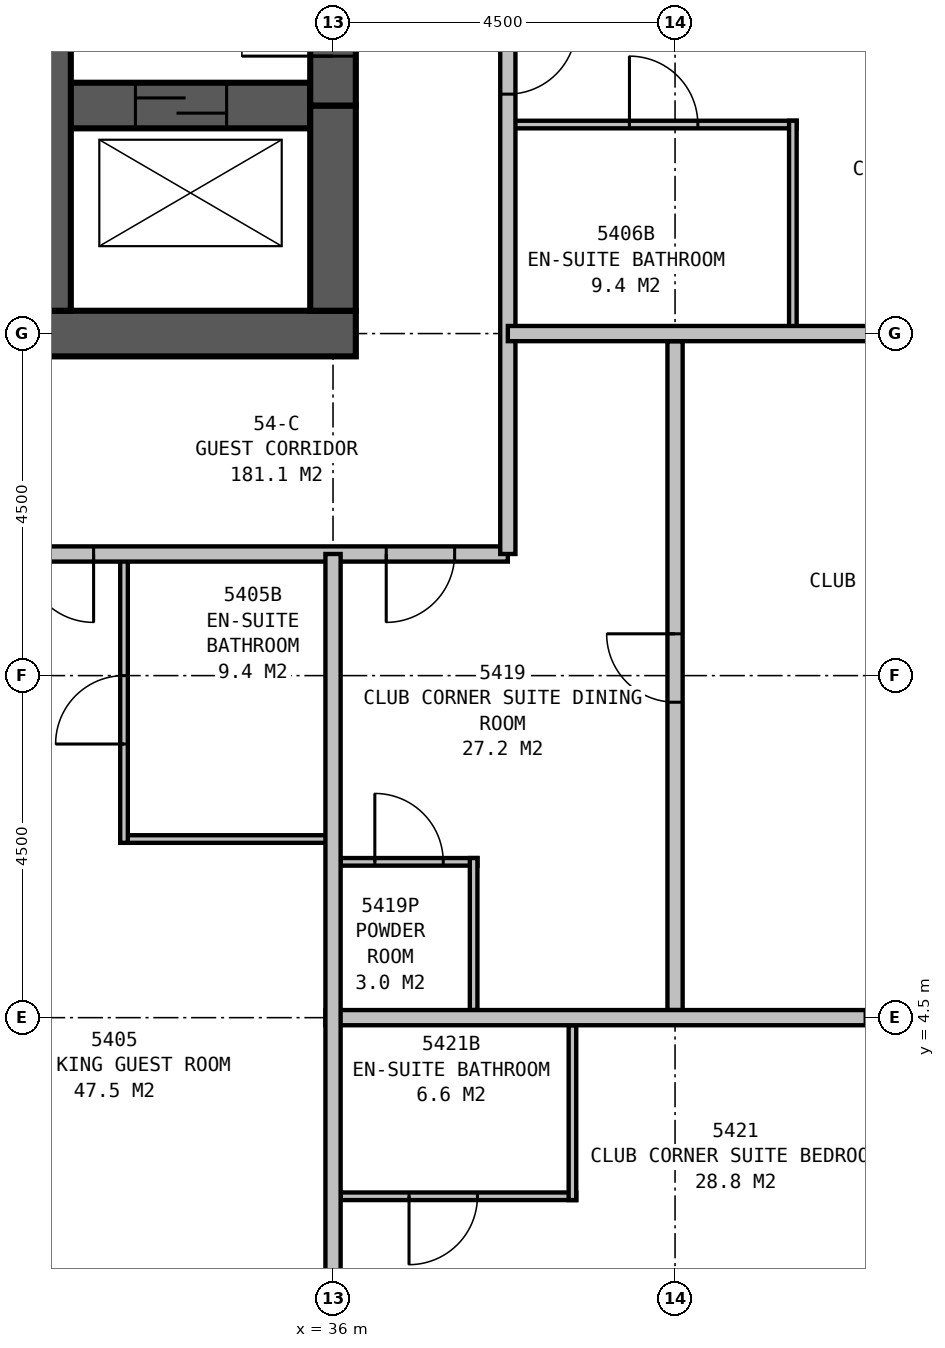
"""IFC4 building model, lengths in metres.
Left out: names, types, materials, properties, quantities, classifications, styles, units other than length and angle.
Written with IfcOpenShell. Run it as: python <this file> out.ifc"""

import sys

from ifc_helpers import new_model, si_unit, direction, frame, frame_2d, origin, place, context, subcontext, project, spatial, rectangle, extrude, element, fill, save


model = new_model("IFC4")
c1 = context("Model", 3, precision=1e-05, world=origin(), true_north=direction((0.0, 1.0)))
c2 = subcontext(c1, "Body", "Model", "MODEL_VIEW")
j1 = project(units=[si_unit("LENGTHUNIT", "METRE"), si_unit("PLANEANGLEUNIT", "RADIAN")], contexts=[c1])
p1 = place(None, origin())
s1 = spatial("IfcSite", under=j1, at=p1, CompositionType="ELEMENT")
p2 = place(p1, origin())
s2 = spatial("IfcBuilding", under=s1, at=p2, CompositionType="ELEMENT")
p3 = place(p2, frame((0.0, 0.0, 207.9)))
s3 = spatial("IfcBuildingStorey", under=s2, at=p3, CompositionType="ELEMENT", Elevation=207.9)
p4 = place(p3, frame((13.2, 13.5, 0.0), z_axis=(0.0, 0.0, 1.0), x_axis=(1.0, 0.0, 0.0)))
e1 = element("IfcWall", 1, at=p4, inside=s3, PredefinedType="SHEAR", context=c2, shape_type="SweptSolid", body=[
    extrude(rectangle(XDim=23.1, YDim=0.6, at=frame_2d((11.55, 0.0))), origin(), (0.0, 0.0, 1.0), 3.5),
])
p5 = place(p3, frame((32.25, 13.8, 0.0), z_axis=(0.0, 0.0, 1.0), x_axis=(0.0, 1.0, 0.0)))
e2 = element("IfcWall", 2, at=p5, inside=s3, PredefinedType="SHEAR", context=c2, shape_type="SweptSolid", body=[
    extrude(rectangle(XDim=12.9, YDim=0.6, at=frame_2d((6.45, 0.0))), origin(), (0.0, 0.0, 1.0), 3.5),
])
p6 = place(p5, frame((5.05, 0.0, 0.0), z_axis=(0.0, 0.0, 1.0), x_axis=(-1.0, 0.0, 0.0)))
e3 = element("IfcOpeningElement", 3, at=p6, cuts=e2, PredefinedType="OPENING", context=c2, shape_type="SweptSolid", body=[
    extrude(rectangle(XDim=1.2, YDim=2.1, at=frame_2d((0.6, 1.05))), frame((0.0, 0.31, 0.0), z_axis=(0.0, -1.0, 0.0), x_axis=(1.0, 0.0, 0.0)), (0.0, 0.0, 1.0), 0.62),
])
p7 = place(p3, frame((13.8, 16.5, 0.0), z_axis=(0.0, 0.0, 1.0), x_axis=(1.0, 0.0, 0.0)))
e4 = element("IfcWall", 4, at=p7, inside=s3, PredefinedType="SHEAR", context=c2, shape_type="SweptSolid", body=[
    extrude(rectangle(XDim=21.9, YDim=0.6, at=frame_2d((10.95, 0.0))), origin(), (0.0, 0.0, 1.0), 3.5),
])
p8 = place(p7, frame((5.75, 0.0, 0.0), z_axis=(0.0, 0.0, 1.0), x_axis=(-1.0, 0.0, 0.0)))
e5 = element("IfcOpeningElement", 5, at=p8, cuts=e4, PredefinedType="OPENING", context=c2, shape_type="SweptSolid", body=[
    extrude(rectangle(XDim=1.0, YDim=2.1, at=frame_2d((0.5, 1.05))), frame((0.0, 0.31, 0.0), z_axis=(0.0, -1.0, 0.0), x_axis=(1.0, 0.0, 0.0)), (0.0, 0.0, 1.0), 0.62),
])
p9 = place(p7, frame((10.2, 0.0, 0.0), z_axis=(0.0, 0.0, 1.0), x_axis=(-1.0, 0.0, 0.0)))
e6 = element("IfcOpeningElement", 6, at=p9, cuts=e4, PredefinedType="OPENING", context=c2, shape_type="SweptSolid", body=[
    extrude(rectangle(XDim=1.0, YDim=2.1, at=frame_2d((0.5, 1.05))), frame((0.0, 0.31, 0.0), z_axis=(0.0, -1.0, 0.0), x_axis=(1.0, 0.0, 0.0)), (0.0, 0.0, 1.0), 0.62),
])
p10 = place(p7, frame((12.7, 0.0, 0.0), z_axis=(0.0, 0.0, 1.0), x_axis=(-1.0, 0.0, 0.0)))
e7 = element("IfcOpeningElement", 7, at=p10, cuts=e4, PredefinedType="OPENING", context=c2, shape_type="SweptSolid", body=[
    extrude(rectangle(XDim=1.0, YDim=2.1, at=frame_2d((0.5, 1.05))), frame((0.0, 0.31, 0.0), z_axis=(0.0, -1.0, 0.0), x_axis=(1.0, 0.0, 0.0)), (0.0, 0.0, 1.0), 0.62),
])
p11 = place(p7, frame((17.15, 0.0, 0.0), z_axis=(0.0, 0.0, 1.0), x_axis=(-1.0, 0.0, 0.0)))
e8 = element("IfcOpeningElement", 8, at=p11, cuts=e4, PredefinedType="OPENING", context=c2, shape_type="SweptSolid", body=[
    extrude(rectangle(XDim=1.0, YDim=2.1, at=frame_2d((0.5, 1.05))), frame((0.0, 0.31, 0.0), z_axis=(0.0, -1.0, 0.0), x_axis=(1.0, 0.0, 0.0)), (0.0, 0.0, 1.0), 0.62),
])
p12 = place(p7, frame((0.6, 0.0, 0.0)))
e9 = element("IfcOpeningElement", 9, at=p12, cuts=e4, PredefinedType="OPENING", context=c2, shape_type="SweptSolid", body=[
    extrude(rectangle(XDim=1.2, YDim=2.1, at=frame_2d((0.6, 1.05))), frame((0.0, 0.31, 0.0), z_axis=(0.0, -1.0, 0.0), x_axis=(1.0, 0.0, 0.0)), (0.0, 0.0, 1.0), 0.62),
])
p13 = place(p7, frame((19.6, 0.0, 0.0)))
e10 = element("IfcOpeningElement", 10, at=p13, cuts=e4, PredefinedType="OPENING", context=c2, shape_type="SweptSolid", body=[
    extrude(rectangle(XDim=1.2, YDim=2.1, at=frame_2d((0.6, 1.05))), frame((0.0, 0.31, 0.0), z_axis=(0.0, -1.0, 0.0), x_axis=(1.0, 0.0, 0.0)), (0.0, 0.0, 1.0), 0.62),
])
p14 = place(p3, frame((36.0, 13.8, 0.0), z_axis=(0.0, 0.0, 1.0), x_axis=(0.0, 1.0, 0.0)))
e11 = element("IfcWall", 11, at=p14, inside=s3, PredefinedType="SHEAR", context=c2, shape_type="SweptSolid", body=[
    extrude(rectangle(XDim=2.7, YDim=0.6, at=frame_2d((1.35, 0.0))), origin(), (0.0, 0.0, 1.0), 3.5),
])
p15 = place(p3, frame((36.0, 16.5, 0.0), z_axis=(0.0, 0.0, 1.0), x_axis=(0.0, 1.0, 0.0)))
e12 = element("IfcWall", 12, at=p15, inside=s3, PredefinedType="SHEAR", context=c2, shape_type="SweptSolid", body=[
    extrude(rectangle(XDim=3.5, YDim=0.6, at=frame_2d((1.75, 0.0))), origin(), (0.0, 0.0, 1.0), 3.5),
])
p16 = place(p15, frame((0.65, 0.0, 0.0)))
e13 = element("IfcOpeningElement", 13, at=p16, cuts=e12, PredefinedType="OPENING", context=c2, shape_type="SweptSolid", body=[
    extrude(rectangle(XDim=1.2, YDim=2.1, at=frame_2d((0.6, 1.05))), frame((0.0, 0.31, 0.0), z_axis=(0.0, -1.0, 0.0), x_axis=(1.0, 0.0, 0.0)), (0.0, 0.0, 1.0), 0.62),
])
p17 = place(p3, frame((11.2, 10.6, 0.0), z_axis=(0.0, 0.0, 1.0), x_axis=(1.0, 0.0, 0.0)))
e14 = element("IfcWall", 14, at=p17, inside=s3, PredefinedType="PARTITIONING", context=c2, shape_type="SweptSolid", body=[
    extrude(rectangle(XDim=27.1, YDim=0.2, at=frame_2d((13.55, 0.0))), origin(), (0.0, 0.0, 1.0), 3.25),
])
p18 = place(p17, frame((3.5, 0.0, 0.0), z_axis=(0.0, 0.0, 1.0), x_axis=(-1.0, 0.0, 0.0)))
e15 = element("IfcOpeningElement", 15, at=p18, cuts=e14, PredefinedType="OPENING", context=c2, shape_type="SweptSolid", body=[
    extrude(rectangle(XDim=0.9, YDim=2.1, at=frame_2d((0.45, 1.05))), frame((0.0, 0.11, 0.0), z_axis=(0.0, -1.0, 0.0), x_axis=(1.0, 0.0, 0.0)), (0.0, 0.0, 1.0), 0.22),
])
p19 = place(p17, frame((15.9, 0.0, 0.0), z_axis=(0.0, 0.0, 1.0), x_axis=(-1.0, 0.0, 0.0)))
e16 = element("IfcOpeningElement", 16, at=p19, cuts=e14, PredefinedType="OPENING", context=c2, shape_type="SweptSolid", body=[
    extrude(rectangle(XDim=1.0, YDim=2.1, at=frame_2d((0.5, 1.05))), frame((0.0, 0.11, 0.0), z_axis=(0.0, -1.0, 0.0), x_axis=(1.0, 0.0, 0.0)), (0.0, 0.0, 1.0), 0.22),
])
p20 = place(p17, frame((21.65, 0.0, 0.0), z_axis=(0.0, 0.0, 1.0), x_axis=(-1.0, 0.0, 0.0)))
e17 = element("IfcOpeningElement", 17, at=p20, cuts=e14, PredefinedType="OPENING", context=c2, shape_type="SweptSolid", body=[
    extrude(rectangle(XDim=0.9, YDim=2.1, at=frame_2d((0.45, 1.05))), frame((0.0, 0.11, 0.0), z_axis=(0.0, -1.0, 0.0), x_axis=(1.0, 0.0, 0.0)), (0.0, 0.0, 1.0), 0.22),
])
p21 = place(p17, frame((1.6, 0.0, 0.0), z_axis=(0.0, 0.0, 1.0), x_axis=(-1.0, 0.0, 0.0)))
e18 = element("IfcOpeningElement", 18, at=p21, cuts=e14, PredefinedType="OPENING", context=c2, shape_type="SweptSolid", body=[
    extrude(rectangle(XDim=0.9, YDim=2.1, at=frame_2d((0.45, 1.05))), frame((0.0, 0.11, 0.0), z_axis=(0.0, -1.0, 0.0), x_axis=(1.0, 0.0, 0.0)), (0.0, 0.0, 1.0), 0.22),
])
p22 = place(p17, frame((26.4, 0.0, 0.0), z_axis=(0.0, 0.0, 1.0), x_axis=(-1.0, 0.0, 0.0)))
e19 = element("IfcOpeningElement", 19, at=p22, cuts=e14, PredefinedType="OPENING", context=c2, shape_type="SweptSolid", body=[
    extrude(rectangle(XDim=0.9, YDim=2.1, at=frame_2d((0.45, 1.05))), frame((0.0, 0.11, 0.0), z_axis=(0.0, -1.0, 0.0), x_axis=(1.0, 0.0, 0.0)), (0.0, 0.0, 1.0), 0.22),
])
p23 = place(p3, frame((38.3, 10.6, 0.0), z_axis=(0.0, 0.0, 1.0), x_axis=(0.0, 1.0, 0.0)))
e20 = element("IfcWall", 20, at=p23, inside=s3, PredefinedType="PARTITIONING", context=c2, shape_type="SweptSolid", body=[
    extrude(rectangle(XDim=18.7, YDim=0.2, at=frame_2d((9.35, 0.0))), origin(), (0.0, 0.0, 1.0), 3.25),
])
p24 = place(p23, frame((6.95, 0.0, 0.0), z_axis=(0.0, 0.0, 1.0), x_axis=(-1.0, 0.0, 0.0)))
e21 = element("IfcOpeningElement", 21, at=p24, cuts=e20, PredefinedType="OPENING", context=c2, shape_type="SweptSolid", body=[
    extrude(rectangle(XDim=0.9, YDim=2.1, at=frame_2d((0.45, 1.05))), frame((0.0, 0.11, 0.0), z_axis=(0.0, -1.0, 0.0), x_axis=(1.0, 0.0, 0.0)), (0.0, 0.0, 1.0), 0.22),
])
p25 = place(p23, frame((10.9, 0.0, 0.0), z_axis=(0.0, 0.0, 1.0), x_axis=(-1.0, 0.0, 0.0)))
e22 = element("IfcOpeningElement", 22, at=p25, cuts=e20, PredefinedType="OPENING", context=c2, shape_type="SweptSolid", body=[
    extrude(rectangle(XDim=0.9, YDim=2.1, at=frame_2d((0.45, 1.05))), frame((0.0, 0.11, 0.0), z_axis=(0.0, -1.0, 0.0), x_axis=(1.0, 0.0, 0.0)), (0.0, 0.0, 1.0), 0.22),
])
p26 = place(p3, frame((33.2, 6.85, 0.0), z_axis=(0.0, 0.0, 1.0), x_axis=(1.0, 0.0, 0.0)))
e23 = element("IfcWall", 23, at=p26, inside=s3, PredefinedType="PLUMBINGWALL", context=c2, shape_type="SweptSolid", body=[
    extrude(rectangle(XDim=2.8, YDim=0.1, at=frame_2d((1.4, 0.0))), origin(), (0.0, 0.0, 1.0), 3.25),
])
p27 = place(p3, frame((33.25, 10.6, 0.0), z_axis=(0.0, 0.0, 1.0), x_axis=(0.0, -1.0, 0.0)))
e24 = element("IfcWall", 24, at=p27, inside=s3, PredefinedType="PLUMBINGWALL", context=c2, shape_type="SweptSolid", body=[
    extrude(rectangle(XDim=3.8, YDim=0.1, at=frame_2d((1.9, 0.0))), origin(), (0.0, 0.0, 1.0), 3.25),
])
p28 = place(p27, frame((2.5, 0.0, 0.0), z_axis=(0.0, 0.0, 1.0), x_axis=(-1.0, 0.0, 0.0)))
e25 = element("IfcOpeningElement", 25, at=p28, cuts=e24, PredefinedType="OPENING", context=c2, shape_type="SweptSolid", body=[
    extrude(rectangle(XDim=0.9, YDim=2.1, at=frame_2d((0.45, 1.05))), frame((0.0, 0.06, 0.0), z_axis=(0.0, -1.0, 0.0), x_axis=(1.0, 0.0, 0.0)), (0.0, 0.0, 1.0), 0.12),
])
p29 = place(p3, frame((42.05, 13.5, 0.0), z_axis=(0.0, 0.0, 1.0), x_axis=(0.0, 1.0, 0.0)))
e26 = element("IfcWall", 26, at=p29, inside=s3, PredefinedType="PLUMBINGWALL", context=c2, shape_type="SweptSolid", body=[
    extrude(rectangle(XDim=2.8, YDim=0.1, at=frame_2d((1.4, 0.0))), origin(), (0.0, 0.0, 1.0), 3.25),
])
p30 = place(p3, frame((38.3, 16.25, 0.0), z_axis=(0.0, 0.0, 1.0), x_axis=(1.0, 0.0, 0.0)))
e27 = element("IfcWall", 27, at=p30, inside=s3, PredefinedType="PLUMBINGWALL", context=c2, shape_type="SweptSolid", body=[
    extrude(rectangle(XDim=3.8, YDim=0.1, at=frame_2d((1.9, 0.0))), origin(), (0.0, 0.0, 1.0), 3.25),
])
p31 = place(p30, frame((1.6, 0.0, 0.0)))
e28 = element("IfcOpeningElement", 28, at=p31, cuts=e27, PredefinedType="OPENING", context=c2, shape_type="SweptSolid", body=[
    extrude(rectangle(XDim=0.9, YDim=2.1, at=frame_2d((0.45, 1.05))), frame((0.0, 0.06, 0.0), z_axis=(0.0, -1.0, 0.0), x_axis=(1.0, 0.0, 0.0)), (0.0, 0.0, 1.0), 0.12),
])
p32 = place(p3, frame((38.3, 13.5, 0.0), z_axis=(0.0, 0.0, 1.0), x_axis=(1.0, 0.0, 0.0)))
e29 = element("IfcWall", 29, at=p32, inside=s3, PredefinedType="PARTITIONING", context=c2, shape_type="SweptSolid", body=[
    extrude(rectangle(XDim=9.921, YDim=0.2, at=frame_2d((4.96, 0.0))), origin(), (0.0, 0.0, 1.0), 1.9),
])
p33 = place(p3, frame((36.0, 10.6, 0.0), z_axis=(0.0, 0.0, 1.0), x_axis=(0.0, -1.0, 0.0)))
e30 = element("IfcWall", 30, at=p33, inside=s3, PredefinedType="PARTITIONING", context=c2, shape_type="SweptSolid", body=[
    extrude(rectangle(XDim=10.6, YDim=0.2, at=frame_2d((5.3, 0.0))), origin(), (0.0, 0.0, 1.0), 2.2),
])
p34 = place(p3, frame((35.9, 4.5, 0.0), z_axis=(0.0, 0.0, 1.0), x_axis=(1.0, 0.0, 0.0)))
e31 = element("IfcWall", 31, at=p34, inside=s3, PredefinedType="PARTITIONING", context=c2, shape_type="SweptSolid", body=[
    extrude(rectangle(XDim=9.1, YDim=0.2, at=frame_2d((4.55, 0.0))), origin(), (0.0, 0.0, 1.0), 3.25),
])
p35 = place(p34, frame((7.1, 0.0, 0.0)))
e32 = element("IfcOpeningElement", 32, at=p35, cuts=e31, PredefinedType="OPENING", context=c2, shape_type="SweptSolid", body=[
    extrude(rectangle(XDim=0.9, YDim=2.1, at=frame_2d((0.45, 1.05))), frame((0.0, 0.11, 0.0), z_axis=(0.0, -1.0, 0.0), x_axis=(1.0, 0.0, 0.0)), (0.0, 0.0, 1.0), 0.22),
])
p36 = place(p3, frame((40.5, 4.6, 0.0), z_axis=(0.0, 0.0, 1.0), x_axis=(0.0, 1.0, 0.0)))
e33 = element("IfcWall", 33, at=p36, inside=s3, PredefinedType="PARTITIONING", context=c2, shape_type="SweptSolid", body=[
    extrude(rectangle(XDim=8.8, YDim=0.2, at=frame_2d((4.4, 0.0))), origin(), (0.0, 0.0, 1.0), 2.2),
])
p37 = place(p36, frame((4.05, 0.0, 0.0)))
e34 = element("IfcOpeningElement", 34, at=p37, cuts=e33, PredefinedType="OPENING", context=c2, shape_type="SweptSolid", body=[
    extrude(rectangle(XDim=0.9, YDim=2.1, at=frame_2d((0.45, 1.05))), frame((0.0, 0.11, 0.0), z_axis=(0.0, -1.0, 0.0), x_axis=(1.0, 0.0, 0.0)), (0.0, 0.0, 1.0), 0.22),
])
p38 = place(p3, frame((37.85, 4.6, 0.0), z_axis=(0.0, 0.0, 1.0), x_axis=(0.0, 1.0, 0.0)))
e35 = element("IfcWall", 35, at=p38, inside=s3, PredefinedType="PLUMBINGWALL", context=c2, shape_type="SweptSolid", body=[
    extrude(rectangle(XDim=2.0, YDim=0.1, at=frame_2d((1.0, 0.0))), origin(), (0.0, 0.0, 1.0), 3.25),
])
p39 = place(p3, frame((36.1, 6.55, 0.0), z_axis=(0.0, 0.0, 1.0), x_axis=(1.0, 0.0, 0.0)))
e36 = element("IfcWall", 36, at=p39, inside=s3, PredefinedType="PLUMBINGWALL", context=c2, shape_type="SweptSolid", body=[
    extrude(rectangle(XDim=1.8, YDim=0.1, at=frame_2d((0.9, 0.0))), origin(), (0.0, 0.0, 1.0), 3.25),
])
p40 = place(p39, frame((0.45, 0.0, 0.0)))
e37 = element("IfcOpeningElement", 37, at=p40, cuts=e36, PredefinedType="OPENING", context=c2, shape_type="SweptSolid", body=[
    extrude(rectangle(XDim=0.9, YDim=2.1, at=frame_2d((0.45, 1.05))), frame((0.0, 0.06, 0.0), z_axis=(0.0, -1.0, 0.0), x_axis=(1.0, 0.0, 0.0)), (0.0, 0.0, 1.0), 0.12),
])
p41 = place(p3, frame((39.15, 4.4, 0.0), z_axis=(0.0, 0.0, 1.0), x_axis=(0.0, -1.0, 0.0)))
e38 = element("IfcWall", 38, at=p41, inside=s3, PredefinedType="PLUMBINGWALL", context=c2, shape_type="SweptSolid", body=[
    extrude(rectangle(XDim=2.3, YDim=0.1, at=frame_2d((1.15, 0.0))), origin(), (0.0, 0.0, 1.0), 3.25),
])
p42 = place(p3, frame((36.1, 2.15, 0.0), z_axis=(0.0, 0.0, 1.0), x_axis=(1.0, 0.0, 0.0)))
e39 = element("IfcWall", 39, at=p42, inside=s3, PredefinedType="PLUMBINGWALL", context=c2, shape_type="SweptSolid", body=[
    extrude(rectangle(XDim=3.1, YDim=0.1, at=frame_2d((1.55, 0.0))), origin(), (0.0, 0.0, 1.0), 3.25),
])
p43 = place(p42, frame((1.8, 0.0, 0.0), z_axis=(0.0, 0.0, 1.0), x_axis=(-1.0, 0.0, 0.0)))
e40 = element("IfcOpeningElement", 40, at=p43, cuts=e39, PredefinedType="OPENING", context=c2, shape_type="SweptSolid", body=[
    extrude(rectangle(XDim=0.9, YDim=2.1, at=frame_2d((0.45, 1.05))), frame((0.0, 0.06, 0.0), z_axis=(0.0, -1.0, 0.0), x_axis=(1.0, 0.0, 0.0)), (0.0, 0.0, 1.0), 0.12),
])
p44 = place(p20, origin())
e41 = element("IfcDoor", 41, at=p44, inside=s3, OperationType="SINGLE_SWING_LEFT", PredefinedType="DOOR", context=c2, shape_type="SweptSolid", body=[
    extrude(rectangle(XDim=0.9, YDim=2.1, at=frame_2d((0.45, 1.05))), frame((0.0, 0.025, 0.0), z_axis=(0.0, -1.0, 0.0), x_axis=(1.0, 0.0, 0.0)), (0.0, 0.0, 1.0), 0.05),
])
fill(e17, e41)
p45 = place(p22, origin())
e42 = element("IfcDoor", 42, at=p45, inside=s3, OperationType="SINGLE_SWING_RIGHT", PredefinedType="DOOR", context=c2, shape_type="SweptSolid", body=[
    extrude(rectangle(XDim=0.9, YDim=2.1, at=frame_2d((0.45, 1.05))), frame((0.0, 0.025, 0.0), z_axis=(0.0, -1.0, 0.0), x_axis=(1.0, 0.0, 0.0)), (0.0, 0.0, 1.0), 0.05),
])
fill(e19, e42)
p46 = place(p24, origin())
e43 = element("IfcDoor", 43, at=p46, inside=s3, OperationType="SINGLE_SWING_LEFT", PredefinedType="DOOR", context=c2, shape_type="SweptSolid", body=[
    extrude(rectangle(XDim=0.9, YDim=2.1, at=frame_2d((0.45, 1.05))), frame((0.0, 0.025, 0.0), z_axis=(0.0, -1.0, 0.0), x_axis=(1.0, 0.0, 0.0)), (0.0, 0.0, 1.0), 0.05),
])
fill(e21, e43)
p47 = place(p28, origin())
e44 = element("IfcDoor", 44, at=p47, inside=s3, OperationType="SINGLE_SWING_LEFT", PredefinedType="DOOR", context=c2, shape_type="SweptSolid", body=[
    extrude(rectangle(XDim=0.9, YDim=2.1, at=frame_2d((0.45, 1.05))), frame((0.0, 0.025, 0.0), z_axis=(0.0, -1.0, 0.0), x_axis=(1.0, 0.0, 0.0)), (0.0, 0.0, 1.0), 0.05),
])
fill(e25, e44)
p48 = place(p31, origin())
e45 = element("IfcDoor", 45, at=p48, inside=s3, OperationType="SINGLE_SWING_LEFT", PredefinedType="DOOR", context=c2, shape_type="SweptSolid", body=[
    extrude(rectangle(XDim=0.9, YDim=2.1, at=frame_2d((0.45, 1.05))), frame((0.0, 0.025, 0.0), z_axis=(0.0, -1.0, 0.0), x_axis=(1.0, 0.0, 0.0)), (0.0, 0.0, 1.0), 0.05),
])
fill(e28, e45)
p49 = place(p37, origin())
e46 = element("IfcDoor", 46, at=p49, inside=s3, OperationType="SINGLE_SWING_RIGHT", PredefinedType="DOOR", context=c2, shape_type="SweptSolid", body=[
    extrude(rectangle(XDim=0.9, YDim=2.1, at=frame_2d((0.45, 1.05))), frame((0.0, 0.025, 0.0), z_axis=(0.0, -1.0, 0.0), x_axis=(1.0, 0.0, 0.0)), (0.0, 0.0, 1.0), 0.05),
])
fill(e34, e46)
p50 = place(p40, origin())
e47 = element("IfcDoor", 47, at=p50, inside=s3, OperationType="SINGLE_SWING_LEFT", PredefinedType="DOOR", context=c2, shape_type="SweptSolid", body=[
    extrude(rectangle(XDim=0.9, YDim=2.1, at=frame_2d((0.45, 1.05))), frame((0.0, 0.025, 0.0), z_axis=(0.0, -1.0, 0.0), x_axis=(1.0, 0.0, 0.0)), (0.0, 0.0, 1.0), 0.05),
])
fill(e37, e47)
p51 = place(p43, origin())
e48 = element("IfcDoor", 48, at=p51, inside=s3, OperationType="SINGLE_SWING_RIGHT", PredefinedType="DOOR", context=c2, shape_type="SweptSolid", body=[
    extrude(rectangle(XDim=0.9, YDim=2.1, at=frame_2d((0.45, 1.05))), frame((0.0, 0.025, 0.0), z_axis=(0.0, -1.0, 0.0), x_axis=(1.0, 0.0, 0.0)), (0.0, 0.0, 1.0), 0.05),
])
fill(e40, e48)
p52 = place(p16, origin())
e49 = element("IfcDoor", 49, at=p52, inside=s3, OperationType="SINGLE_SWING_LEFT", PredefinedType="DOOR", context=c2, shape_type="SweptSolid", body=[
    extrude(rectangle(XDim=1.2, YDim=2.1, at=frame_2d((0.6, 1.05))), frame((0.0, 0.3, 0.0), z_axis=(0.0, -1.0, 0.0), x_axis=(1.0, 0.0, 0.0)), (0.0, 0.0, 1.0), 0.6),
])
fill(e13, e49)
p53 = place(p13, origin())
e50 = element("IfcDoor", 50, at=p53, inside=s3, OperationType="SLIDING_TO_LEFT", PredefinedType="DOOR", context=c2, shape_type="SweptSolid", body=[
    extrude(rectangle(XDim=1.2, YDim=2.1, at=frame_2d((0.6, 1.05))), frame((0.0, 0.3, 0.0), z_axis=(0.0, -1.0, 0.0), x_axis=(1.0, 0.0, 0.0)), (0.0, 0.0, 1.0), 0.6),
])
fill(e10, e50)
save(model, sys.argv[1])
